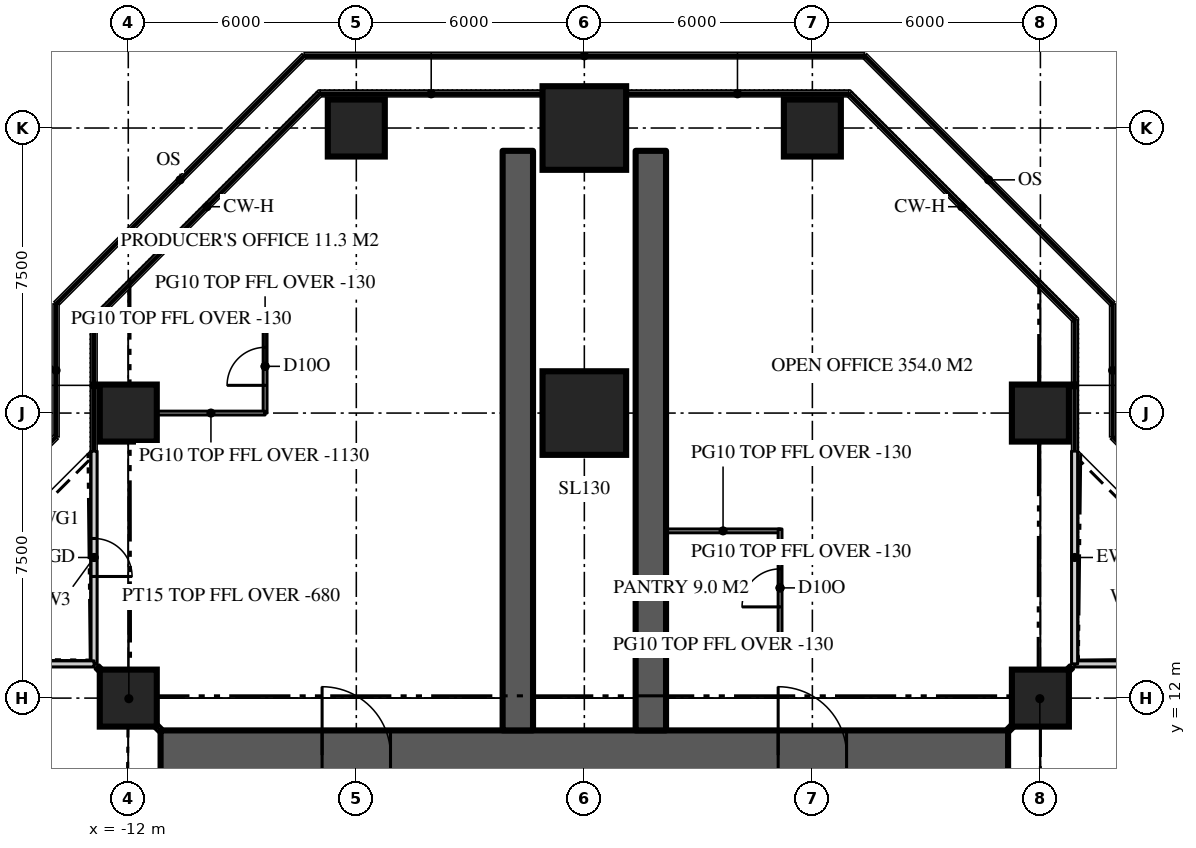
"""IFC4 building model, lengths in metres.
Left out: names, types, materials, properties, quantities, classifications, styles, units other than length and angle.
Written with IfcOpenShell. Run it as: python <this file> out.ifc"""

import sys

from ifc_helpers import new_model, si_unit, direction, frame, frame_2d, origin, origin_2d, place, context, subcontext, project, spatial, rectangle, extrude, element, fill, save


model = new_model("IFC4")
c1 = context("Model", 3, precision=1e-05, world=origin(), true_north=direction((0.0, 1.0)))
c2 = subcontext(c1, "Body", "Model", "MODEL_VIEW")
j1 = project(units=[si_unit("LENGTHUNIT", "METRE"), si_unit("PLANEANGLEUNIT", "RADIAN")], contexts=[c1])
p1 = place(None, origin())
s1 = spatial("IfcSite", under=j1, at=p1, CompositionType="ELEMENT")
p2 = place(p1, origin())
s2 = spatial("IfcBuilding", under=s1, at=p2, CompositionType="ELEMENT")
p3 = place(p2, frame((0.0, 0.0, 208.8)))
s3 = spatial("IfcBuildingStorey", under=s2, at=p3, CompositionType="ELEMENT", Elevation=208.8)
p4 = place(p3, frame((-11.15, 10.5, 0.0), z_axis=(0.0, 0.0, 1.0), x_axis=(1.0, 0.0, 0.0)))
e1 = element("IfcWall", 1, at=p4, inside=s3, PredefinedType="SHEAR", context=c2, shape_type="SweptSolid", body=[
    extrude(rectangle(XDim=22.3, YDim=1.3, at=frame_2d((11.15, 0.0))), origin(), (0.0, 0.0, 1.0), 3.9),
])
p5 = place(p4, frame((4.25, 0.0, 0.0)))
e2 = element("IfcOpeningElement", 2, at=p5, cuts=e1, PredefinedType="OPENING", context=c2, shape_type="SweptSolid", body=[
    extrude(rectangle(XDim=1.8, YDim=2.2, at=frame_2d((0.9, 1.1))), frame((0.0, 0.66, 0.0), z_axis=(0.0, -1.0, 0.0), x_axis=(1.0, 0.0, 0.0)), (0.0, 0.0, 1.0), 1.32),
])
p6 = place(p4, frame((16.25, 0.0, 0.0)))
e3 = element("IfcOpeningElement", 3, at=p6, cuts=e1, PredefinedType="OPENING", context=c2, shape_type="SweptSolid", body=[
    extrude(rectangle(XDim=1.8, YDim=2.2, at=frame_2d((0.9, 1.1))), frame((0.0, 0.66, 0.0), z_axis=(0.0, -1.0, 0.0), x_axis=(1.0, 0.0, 0.0)), (0.0, 0.0, 1.0), 1.32),
])
for number, where, z_axis, x_axis in (
    (4, (1.75, 11.15, 0.0), (0.0, 0.0, 1.0), (0.0, 1.0, 0.0)),
    (5, (-1.75, 11.15, 0.0), (0.0, 0.0, 1.0), (0.0, 1.0, 0.0)),
):
    element("IfcWall", number, at=place(p3, frame(where, z_axis=z_axis, x_axis=x_axis)), inside=s3, PredefinedType="SHEAR", context=c2, shape_type="SweptSolid", body=[
        extrude(rectangle(XDim=15.25, YDim=0.8, at=frame_2d((7.625, 0.0))), origin(), (0.0, 0.0, 1.0), 3.9),
    ])
for number, where, z_axis, x_axis in (
    (6, (-12.0, 12.0, 0.0), (0.0, 0.0, 1.0), (1.0, 0.0, 0.0)),
    (7, (12.0, 12.0, 0.0), (0.0, 0.0, 1.0), (1.0, 0.0, 0.0)),
    (8, (-12.0, 19.5, 0.0), (0.0, 0.0, 1.0), (1.0, 0.0, 0.0)),
):
    element("IfcColumn", number, at=place(p3, frame(where, z_axis=z_axis, x_axis=x_axis)), inside=s3, PredefinedType="COLUMN", context=c2, shape_type="SweptSolid", body=[
        extrude(rectangle(XDim=1.5, YDim=1.5, at=origin_2d()), origin(), (0.0, 0.0, 1.0), 3.9),
    ])
p7 = place(p3, frame((0.0, 19.5, 0.0), z_axis=(0.0, 0.0, 1.0), x_axis=(1.0, 0.0, 0.0)))
e9 = element("IfcColumn", 9, at=p7, inside=s3, PredefinedType="COLUMN", context=c2, shape_type="SweptSolid", body=[
    extrude(rectangle(XDim=2.2, YDim=2.2, at=origin_2d()), origin(), (0.0, 0.0, 1.0), 3.9),
])
for number, where, z_axis, x_axis in (
    (10, (12.0, 19.5, 0.0), (0.0, 0.0, 1.0), (1.0, 0.0, 0.0)),
    (11, (-6.0, 27.0, 0.0), (0.0, 0.0, 1.0), (1.0, 0.0, 0.0)),
):
    element("IfcColumn", number, at=place(p3, frame(where, z_axis=z_axis, x_axis=x_axis)), inside=s3, PredefinedType="COLUMN", context=c2, shape_type="SweptSolid", body=[
        extrude(rectangle(XDim=1.5, YDim=1.5, at=origin_2d()), origin(), (0.0, 0.0, 1.0), 3.9),
    ])
p8 = place(p3, frame((0.0, 27.0, 0.0), z_axis=(0.0, 0.0, 1.0), x_axis=(1.0, 0.0, 0.0)))
e12 = element("IfcColumn", 12, at=p8, inside=s3, PredefinedType="COLUMN", context=c2, shape_type="SweptSolid", body=[
    extrude(rectangle(XDim=2.2, YDim=2.2, at=origin_2d()), origin(), (0.0, 0.0, 1.0), 3.9),
])
p9 = place(p3, frame((6.0, 27.0, 0.0), z_axis=(0.0, 0.0, 1.0), x_axis=(1.0, 0.0, 0.0)))
e13 = element("IfcColumn", 13, at=p9, inside=s3, PredefinedType="COLUMN", context=c2, shape_type="SweptSolid", body=[
    extrude(rectangle(XDim=1.5, YDim=1.5, at=origin_2d()), origin(), (0.0, 0.0, 1.0), 3.9),
])
p10 = place(p3, frame((18.5, 12.9, 0.0), z_axis=(0.0, 0.0, 1.0), x_axis=(-1.0, 0.0, 0.0)))
e14 = element("IfcWall", 14, at=p10, inside=s3, PredefinedType="SOLIDWALL", context=c2, shape_type="SweptSolid", body=[
    extrude(rectangle(XDim=5.6, YDim=0.16, at=frame_2d((2.8, 0.0))), origin(), (0.0, 0.0, 1.0), 3.77),
])
p11 = place(p10, frame((2.3, 0.0, 0.0)))
e15 = element("IfcOpeningElement", 15, at=p11, cuts=e14, PredefinedType="OPENING", context=c2, shape_type="SweptSolid", body=[
    extrude(rectangle(XDim=1.0, YDim=2.2, at=frame_2d((0.5, 1.1))), frame((0.0, 0.09, 0.0), z_axis=(0.0, -1.0, 0.0), x_axis=(1.0, 0.0, 0.0)), (0.0, 0.0, 1.0), 0.18),
])
p12 = place(p3, frame((12.9, 12.9, 0.0), z_axis=(0.0, 0.0, 1.0), x_axis=(0.0, 1.0, 0.0)))
e16 = element("IfcWall", 16, at=p12, inside=s3, PredefinedType="SOLIDWALL", context=c2, shape_type="SweptSolid", body=[
    extrude(rectangle(XDim=5.6, YDim=0.16, at=frame_2d((2.8, 0.0))), origin(), (0.0, 0.0, 1.0), 3.77),
])
p13 = place(p3, frame((-12.9, 18.5, 0.0), z_axis=(0.0, 0.0, 1.0), x_axis=(0.0, -1.0, 0.0)))
e17 = element("IfcWall", 17, at=p13, inside=s3, PredefinedType="SOLIDWALL", context=c2, shape_type="SweptSolid", body=[
    extrude(rectangle(XDim=5.6, YDim=0.16, at=frame_2d((2.8, 0.0))), origin(), (0.0, 0.0, 1.0), 3.77),
])
p14 = place(p13, frame((2.3, 0.0, 0.0)))
e18 = element("IfcOpeningElement", 18, at=p14, cuts=e17, PredefinedType="OPENING", context=c2, shape_type="SweptSolid", body=[
    extrude(rectangle(XDim=1.0, YDim=2.2, at=frame_2d((0.5, 1.1))), frame((0.0, 0.09, 0.0), z_axis=(0.0, -1.0, 0.0), x_axis=(1.0, 0.0, 0.0)), (0.0, 0.0, 1.0), 0.18),
])
p15 = place(p3, frame((-12.9, 12.9, 0.0), z_axis=(0.0, 0.0, 1.0), x_axis=(-1.0, 0.0, 0.0)))
e19 = element("IfcWall", 19, at=p15, inside=s3, PredefinedType="SOLIDWALL", context=c2, shape_type="SweptSolid", body=[
    extrude(rectangle(XDim=5.6, YDim=0.16, at=frame_2d((2.8, 0.0))), origin(), (0.0, 0.0, 1.0), 3.77),
])
p16 = place(p3, frame((-8.4, 19.5, 0.0), z_axis=(0.0, 0.0, 1.0), x_axis=(0.0, 1.0, 0.0)))
e20 = element("IfcWall", 20, at=p16, inside=s3, PredefinedType="PARTITIONING", context=c2, shape_type="SweptSolid", body=[
    extrude(rectangle(XDim=2.459, YDim=0.1, at=frame_2d((1.229, 0.0))), origin(), (0.0, 0.0, 1.0), 3.77),
])
p17 = place(p16, frame((0.729, 0.0, 0.0)))
e21 = element("IfcOpeningElement", 21, at=p17, cuts=e20, PredefinedType="OPENING", context=c2, shape_type="SweptSolid", body=[
    extrude(rectangle(XDim=1.0, YDim=2.2, at=frame_2d((0.5, 1.1))), frame((0.0, 0.06, 0.0), z_axis=(0.0, -1.0, 0.0), x_axis=(1.0, 0.0, 0.0)), (0.0, 0.0, 1.0), 0.12),
])
p18 = place(p3, frame((-8.4, 19.5, 0.0), z_axis=(0.0, 0.0, 1.0), x_axis=(-1.0, 0.0, 0.0)))
e22 = element("IfcWall", 22, at=p18, inside=s3, PredefinedType="PARTITIONING", context=c2, shape_type="SweptSolid", body=[
    extrude(rectangle(XDim=2.85, YDim=0.1, at=frame_2d((1.425, 0.0))), origin(), (0.0, 0.0, 1.0), 2.77),
])
p19 = place(p3, frame((-8.4, 21.959, 0.0), z_axis=(0.0, 0.0, 1.0), x_axis=(-1.0, 0.0, 0.0)))
e23 = element("IfcWall", 23, at=p19, inside=s3, PredefinedType="PARTITIONING", context=c2, shape_type="SweptSolid", body=[
    extrude(rectangle(XDim=4.42, YDim=0.1, at=frame_2d((2.21, 0.0))), origin(), (0.0, 0.0, 1.0), 3.77),
])
for number, where, z_axis, x_axis in (
    (24, (2.15, 13.4, 0.0), (0.0, 0.0, 1.0), (1.0, 0.0, 0.0)),
    (25, (2.15, 16.4, 0.0), (0.0, 0.0, 1.0), (1.0, 0.0, 0.0)),
):
    element("IfcWall", number, at=place(p3, frame(where, z_axis=z_axis, x_axis=x_axis)), inside=s3, PredefinedType="PARTITIONING", context=c2, shape_type="SweptSolid", body=[
        extrude(rectangle(XDim=3.0, YDim=0.1, at=frame_2d((1.5, 0.0))), origin(), (0.0, 0.0, 1.0), 3.77),
    ])
p20 = place(p3, frame((5.15, 13.35, 0.0), z_axis=(0.0, 0.0, 1.0), x_axis=(0.0, 1.0, 0.0)))
e26 = element("IfcWall", 26, at=p20, inside=s3, PredefinedType="PARTITIONING", context=c2, shape_type="SweptSolid", body=[
    extrude(rectangle(XDim=3.1, YDim=0.1, at=frame_2d((1.55, 0.0))), origin(), (0.0, 0.0, 1.0), 3.77),
])
p21 = place(p20, frame((1.05, 0.0, 0.0)))
e27 = element("IfcOpeningElement", 27, at=p21, cuts=e26, PredefinedType="OPENING", context=c2, shape_type="SweptSolid", body=[
    extrude(rectangle(XDim=1.0, YDim=2.2, at=frame_2d((0.5, 1.1))), frame((0.0, 0.06, 0.0), z_axis=(0.0, -1.0, 0.0), x_axis=(1.0, 0.0, 0.0)), (0.0, 0.0, 1.0), 0.12),
])
for number, where, z_axis, x_axis in (
    (28, (11.15, 11.15, 0.0), (0.0, 0.0, 1.0), (0.707, 0.707, 0.0)),
    (29, (-11.15, 11.15, 0.0), (0.0, 0.0, 1.0), (-0.707, 0.707, 0.0)),
):
    element("IfcWall", number, at=place(p3, frame(where, z_axis=z_axis, x_axis=x_axis)), inside=s3, PredefinedType="PARTITIONING", context=c2, shape_type="SweptSolid", body=[
        extrude(rectangle(XDim=2.362, YDim=0.15, at=frame_2d((1.181, 0.0))), origin(), (0.0, 0.0, 1.0), 3.22),
    ])
p22 = place(p14, origin())
e30 = element("IfcDoor", 30, at=p22, inside=s3, OperationType="SINGLE_SWING_RIGHT", PredefinedType="DOOR", context=c2, shape_type="SweptSolid", body=[
    extrude(rectangle(XDim=1.0, YDim=2.2, at=frame_2d((0.5, 1.1))), frame((0.0, 0.025, 0.0), z_axis=(0.0, -1.0, 0.0), x_axis=(1.0, 0.0, 0.0)), (0.0, 0.0, 1.0), 0.05),
])
fill(e18, e30)
p23 = place(p5, origin())
e31 = element("IfcDoor", 31, at=p23, inside=s3, OperationType="DOUBLE_DOOR_DOUBLE_SWING", PredefinedType="DOOR", context=c2, shape_type="SweptSolid", body=[
    extrude(rectangle(XDim=1.8, YDim=2.2, at=frame_2d((0.9, 1.1))), frame((0.0, 0.025, 0.0), z_axis=(0.0, -1.0, 0.0), x_axis=(1.0, 0.0, 0.0)), (0.0, 0.0, 1.0), 0.05),
])
fill(e2, e31)
p24 = place(p6, origin())
e32 = element("IfcDoor", 32, at=p24, inside=s3, OperationType="DOUBLE_DOOR_DOUBLE_SWING", PredefinedType="DOOR", context=c2, shape_type="SweptSolid", body=[
    extrude(rectangle(XDim=1.8, YDim=2.2, at=frame_2d((0.9, 1.1))), frame((0.0, 0.025, 0.0), z_axis=(0.0, -1.0, 0.0), x_axis=(1.0, 0.0, 0.0)), (0.0, 0.0, 1.0), 0.05),
])
fill(e3, e32)
p25 = place(p17, origin())
e33 = element("IfcDoor", 33, at=p25, inside=s3, OperationType="SINGLE_SWING_LEFT", PredefinedType="DOOR", context=c2, shape_type="SweptSolid", body=[
    extrude(rectangle(XDim=1.0, YDim=2.2, at=frame_2d((0.5, 1.1))), frame((0.0, 0.025, 0.0), z_axis=(0.0, -1.0, 0.0), x_axis=(1.0, 0.0, 0.0)), (0.0, 0.0, 1.0), 0.05),
])
fill(e21, e33)
p26 = place(p21, origin())
e34 = element("IfcDoor", 34, at=p26, inside=s3, OperationType="SINGLE_SWING_LEFT", PredefinedType="DOOR", context=c2, shape_type="SweptSolid", body=[
    extrude(rectangle(XDim=1.0, YDim=2.2, at=frame_2d((0.5, 1.1))), frame((0.0, 0.025, 0.0), z_axis=(0.0, -1.0, 0.0), x_axis=(1.0, 0.0, 0.0)), (0.0, 0.0, 1.0), 0.05),
])
fill(e27, e34)
save(model, sys.argv[1])
